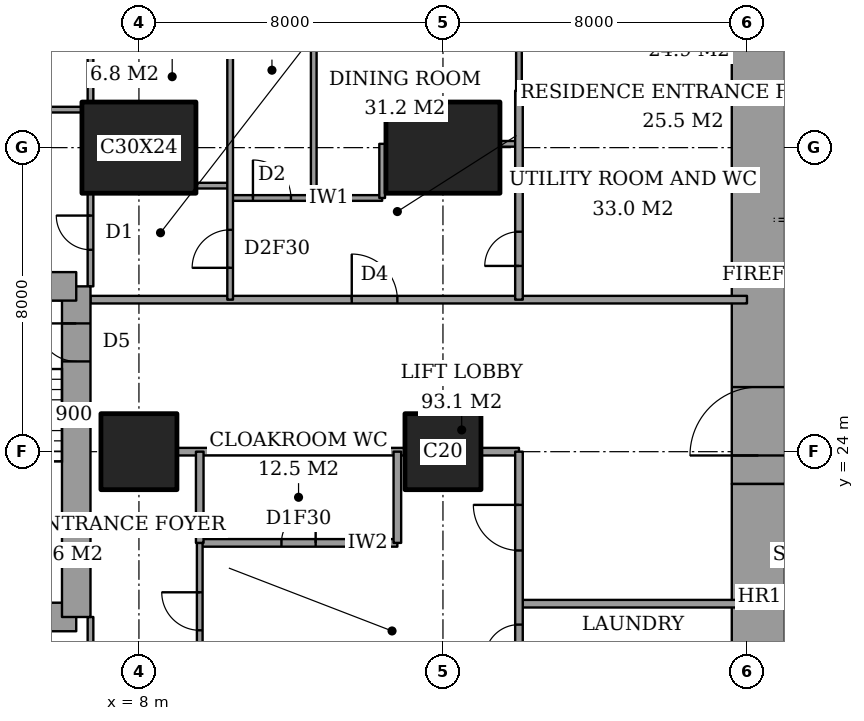
"""IFC4 building model, lengths in metres.
Left out: names, types, materials, properties, quantities, classifications, styles, units other than length and angle.
Written with IfcOpenShell. Run it as: python <this file> out.ifc"""

import sys

from ifc_helpers import new_model, si_unit, direction, frame, frame_2d, origin, origin_2d, place, context, subcontext, project, spatial, rectangle, extrude, element, fill, save


model = new_model("IFC4")
c1 = context("Model", 3, precision=1e-05, world=origin(), true_north=direction((0.0, 1.0)))
c2 = subcontext(c1, "Body", "Model", "MODEL_VIEW")
j1 = project(units=[si_unit("LENGTHUNIT", "METRE"), si_unit("PLANEANGLEUNIT", "RADIAN")], contexts=[c1])
p1 = place(None, origin())
s1 = spatial("IfcSite", under=j1, at=p1, CompositionType="ELEMENT")
p2 = place(p1, origin())
s2 = spatial("IfcBuilding", under=s1, at=p2, CompositionType="ELEMENT")
p3 = place(p2, frame((0.0, 0.0, 164.6)))
s3 = spatial("IfcBuildingStorey", under=s2, at=p3, CompositionType="ELEMENT", Elevation=164.6)
p4 = place(p3, frame((8.0, 24.0, 0.0), z_axis=(0.0, 0.0, 1.0), x_axis=(1.0, 0.0, 0.0)))
e1 = element("IfcColumn", 1, at=p4, inside=s3, PredefinedType="COLUMN", context=c2, shape_type="SweptSolid", body=[
    extrude(rectangle(XDim=2.0, YDim=2.0, at=origin_2d()), origin(), (0.0, 0.0, 1.0), 3.6),
])
p5 = place(p3, frame((8.0, 32.0, 0.0), z_axis=(0.0, 0.0, 1.0), x_axis=(1.0, 0.0, 0.0)))
e2 = element("IfcColumn", 2, at=p5, inside=s3, PredefinedType="COLUMN", context=c2, shape_type="SweptSolid", body=[
    extrude(rectangle(XDim=3.0, YDim=2.4, at=origin_2d()), origin(), (0.0, 0.0, 1.0), 3.6),
])
p6 = place(p3, frame((16.0, 24.0, 0.0), z_axis=(0.0, 0.0, 1.0), x_axis=(1.0, 0.0, 0.0)))
e3 = element("IfcColumn", 3, at=p6, inside=s3, PredefinedType="COLUMN", context=c2, shape_type="SweptSolid", body=[
    extrude(rectangle(XDim=2.0, YDim=2.0, at=origin_2d()), origin(), (0.0, 0.0, 1.0), 3.6),
])
p7 = place(p3, frame((16.0, 32.0, 0.0), z_axis=(0.0, 0.0, 1.0), x_axis=(1.0, 0.0, 0.0)))
e4 = element("IfcColumn", 4, at=p7, inside=s3, PredefinedType="COLUMN", context=c2, shape_type="SweptSolid", body=[
    extrude(rectangle(XDim=3.0, YDim=2.4, at=origin_2d()), origin(), (0.0, 0.0, 1.0), 3.6),
])
p8 = place(p3, frame((24.3, 13.0, 0.0), z_axis=(0.0, 0.0, 1.0), x_axis=(0.0, 1.0, 0.0)))
e5 = element("IfcWall", 5, at=p8, inside=s3, PredefinedType="SHEAR", context=c2, shape_type="SweptSolid", body=[
    extrude(rectangle(XDim=10.15, YDim=1.4, at=frame_2d((5.075, 0.0))), origin(), (0.0, 0.0, 1.0), 3.6),
])
p9 = place(p3, frame((24.3, 23.15, 0.0), z_axis=(0.0, 0.0, 1.0), x_axis=(0.0, 1.0, 0.0)))
e6 = element("IfcWall", 6, at=p9, inside=s3, PredefinedType="SHEAR", context=c2, shape_type="SweptSolid", body=[
    extrude(rectangle(XDim=11.85, YDim=1.4, at=frame_2d((5.925, 0.0))), origin(), (0.0, 0.0, 1.0), 3.6),
])
p10 = place(p9, frame((0.75, 0.0, 0.0)))
e7 = element("IfcOpeningElement", 7, at=p10, cuts=e6, PredefinedType="OPENING", context=c2, shape_type="SweptSolid", body=[
    extrude(rectangle(XDim=1.8, YDim=2.4, at=frame_2d((0.9, 1.2))), frame((0.0, 0.71, 0.0), z_axis=(0.0, -1.0, 0.0), x_axis=(1.0, 0.0, 0.0)), (0.0, 0.0, 1.0), 1.42),
])
p11 = place(p3, frame((1.9, 19.65, 0.0), z_axis=(0.0, 0.0, 1.0), x_axis=(1.0, 0.0, 0.0)))
e8 = element("IfcWall", 8, at=p11, inside=s3, PredefinedType="SHEAR", context=c2, shape_type="SweptSolid", body=[
    extrude(rectangle(XDim=4.45, YDim=0.75, at=frame_2d((2.225, 0.0))), origin(), (0.0, 0.0, 1.0), 3.6),
])
p12 = place(p3, frame((6.35, 19.65, 0.0), z_axis=(0.0, 0.0, 1.0), x_axis=(0.0, 1.0, 0.0)))
e9 = element("IfcWall", 9, at=p12, inside=s3, PredefinedType="SHEAR", context=c2, shape_type="SweptSolid", body=[
    extrude(rectangle(XDim=8.7, YDim=0.75, at=frame_2d((4.35, 0.0))), origin(), (0.0, 0.0, 1.0), 3.6),
])
p13 = place(p12, frame((6.725, 0.0, 0.0)))
e10 = element("IfcOpeningElement", 10, at=p13, cuts=e9, PredefinedType="OPENING", context=c2, shape_type="SweptSolid", body=[
    extrude(rectangle(XDim=1.0, YDim=2.1, at=frame_2d((0.5, 1.05))), frame((0.0, 0.385, 0.0), z_axis=(0.0, -1.0, 0.0), x_axis=(1.0, 0.0, 0.0)), (0.0, 0.0, 1.0), 0.77),
])
p14 = place(p3, frame((6.35, 28.35, 0.0), z_axis=(0.0, 0.0, 1.0), x_axis=(-1.0, 0.0, 0.0)))
e11 = element("IfcWall", 11, at=p14, inside=s3, PredefinedType="SHEAR", context=c2, shape_type="SweptSolid", body=[
    extrude(rectangle(XDim=4.45, YDim=0.75, at=frame_2d((2.225, 0.0))), origin(), (0.0, 0.0, 1.0), 3.6),
])
p15 = place(p3, frame((18.0, 20.0, 0.0), z_axis=(0.0, 0.0, 1.0), x_axis=(1.0, 0.0, 0.0)))
e12 = element("IfcWall", 12, at=p15, inside=s3, PredefinedType="PARTITIONING", context=c2, shape_type="SweptSolid", body=[
    extrude(rectangle(XDim=6.0, YDim=0.2, at=frame_2d((3.0, 0.0))), origin(), (0.0, 0.0, 1.0), 3.35),
])
p16 = place(p3, frame((9.6, 21.6, 0.0), z_axis=(0.0, 0.0, 1.0), x_axis=(1.0, 0.0, 0.0)))
e13 = element("IfcWall", 13, at=p16, inside=s3, PredefinedType="PARTITIONING", context=c2, shape_type="SweptSolid", body=[
    extrude(rectangle(XDim=5.2, YDim=0.2, at=frame_2d((2.6, 0.0))), origin(), (0.0, 0.0, 1.0), 3.35),
])
p17 = place(p16, frame((2.15, 0.0, 0.0)))
e14 = element("IfcOpeningElement", 14, at=p17, cuts=e13, PredefinedType="OPENING", context=c2, shape_type="SweptSolid", body=[
    extrude(rectangle(XDim=0.9, YDim=2.1, at=frame_2d((0.45, 1.05))), frame((0.0, 0.11, 0.0), z_axis=(0.0, -1.0, 0.0), x_axis=(1.0, 0.0, 0.0)), (0.0, 0.0, 1.0), 0.22),
])
p18 = place(p3, frame((9.0, 24.0, 0.0), z_axis=(0.0, 0.0, 1.0), x_axis=(1.0, 0.0, 0.0)))
e15 = element("IfcWall", 15, at=p18, inside=s3, PredefinedType="PARTITIONING", context=c2, shape_type="SweptSolid", body=[
    extrude(rectangle(XDim=6.0, YDim=0.2, at=frame_2d((3.0, 0.0))), origin(), (0.0, 0.0, 1.0), 3.35),
])
p19 = place(p3, frame((17.0, 24.0, 0.0), z_axis=(0.0, 0.0, 1.0), x_axis=(1.0, 0.0, 0.0)))
e16 = element("IfcWall", 16, at=p19, inside=s3, PredefinedType="PARTITIONING", context=c2, shape_type="SweptSolid", body=[
    extrude(rectangle(XDim=1.0, YDim=0.2, at=frame_2d((0.5, 0.0))), origin(), (0.0, 0.0, 1.0), 3.35),
])
p20 = place(p3, frame((6.725, 28.0, 0.0), z_axis=(0.0, 0.0, 1.0), x_axis=(1.0, 0.0, 0.0)))
e17 = element("IfcWall", 17, at=p20, inside=s3, PredefinedType="PARTITIONING", context=c2, shape_type="SweptSolid", body=[
    extrude(rectangle(XDim=17.275, YDim=0.2, at=frame_2d((8.637, 0.0))), origin(), (0.0, 0.0, 1.0), 3.35),
])
p21 = place(p20, frame((6.875, 0.0, 0.0)))
e18 = element("IfcOpeningElement", 18, at=p21, cuts=e17, PredefinedType="OPENING", context=c2, shape_type="SweptSolid", body=[
    extrude(rectangle(XDim=1.2, YDim=2.4, at=frame_2d((0.6, 1.2))), frame((0.0, 0.11, 0.0), z_axis=(0.0, -1.0, 0.0), x_axis=(1.0, 0.0, 0.0)), (0.0, 0.0, 1.0), 0.22),
])
p22 = place(p3, frame((10.4, 30.675, 0.0), z_axis=(0.0, 0.0, 1.0), x_axis=(1.0, 0.0, 0.0)))
e19 = element("IfcWall", 19, at=p22, inside=s3, PredefinedType="PARTITIONING", context=c2, shape_type="SweptSolid", body=[
    extrude(rectangle(XDim=4.0, YDim=0.15, at=frame_2d((2.0, 0.0))), origin(), (0.0, 0.0, 1.0), 3.35),
])
p23 = place(p22, frame((0.6, 0.0, 0.0)))
e20 = element("IfcOpeningElement", 20, at=p23, cuts=e19, PredefinedType="OPENING", context=c2, shape_type="SweptSolid", body=[
    extrude(rectangle(XDim=1.0, YDim=2.1, at=frame_2d((0.5, 1.05))), frame((0.0, 0.085, 0.0), z_axis=(0.0, -1.0, 0.0), x_axis=(1.0, 0.0, 0.0)), (0.0, 0.0, 1.0), 0.17),
])
p24 = place(p3, frame((9.5, 31.0, 0.0), z_axis=(0.0, 0.0, 1.0), x_axis=(1.0, 0.0, 0.0)))
e21 = element("IfcWall", 21, at=p24, inside=s3, PredefinedType="PARTITIONING", context=c2, shape_type="SweptSolid", body=[
    extrude(rectangle(XDim=0.9, YDim=0.15, at=frame_2d((0.45, 0.0))), origin(), (0.0, 0.0, 1.0), 3.35),
])
p25 = place(p3, frame((17.5, 32.1, 0.0), z_axis=(0.0, 0.0, 1.0), x_axis=(1.0, 0.0, 0.0)))
e22 = element("IfcWall", 22, at=p25, inside=s3, PredefinedType="PARTITIONING", context=c2, shape_type="SweptSolid", body=[
    extrude(rectangle(XDim=0.5, YDim=0.15, at=frame_2d((0.25, 0.0))), origin(), (0.0, 0.0, 1.0), 2.634),
])
p26 = place(p3, frame((1.35, 33.0, 0.0), z_axis=(0.0, 0.0, 1.0), x_axis=(1.0, 0.0, 0.0)))
e23 = element("IfcWall", 23, at=p26, inside=s3, PredefinedType="PARTITIONING", context=c2, shape_type="SweptSolid", body=[
    extrude(rectangle(XDim=5.15, YDim=0.15, at=frame_2d((2.575, 0.0))), origin(), (0.0, 0.0, 1.0), 3.35),
])
p27 = place(p3, frame((18.0, 33.5, 0.0), z_axis=(0.0, 0.0, 1.0), x_axis=(1.0, 0.0, 0.0)))
e24 = element("IfcWall", 24, at=p27, inside=s3, PredefinedType="PARTITIONING", context=c2, shape_type="SweptSolid", body=[
    extrude(rectangle(XDim=6.0, YDim=0.2, at=frame_2d((3.0, 0.0))), origin(), (0.0, 0.0, 1.0), 3.35),
])
p28 = place(p3, frame((6.725, 17.2, 0.0), z_axis=(0.0, 0.0, 1.0), x_axis=(0.0, 1.0, 0.0)))
e25 = element("IfcWall", 25, at=p28, inside=s3, PredefinedType="PARTITIONING", context=c2, shape_type="SweptSolid", body=[
    extrude(rectangle(XDim=2.45, YDim=0.15, at=frame_2d((1.225, 0.0))), origin(), (0.0, 0.0, 1.0), 3.35),
])
p29 = place(p28, frame((0.538, 0.0, 0.0)))
e26 = element("IfcOpeningElement", 26, at=p29, cuts=e25, PredefinedType="OPENING", context=c2, shape_type="SweptSolid", body=[
    extrude(rectangle(XDim=1.0, YDim=2.1, at=frame_2d((0.5, 1.05))), frame((0.0, 0.085, 0.0), z_axis=(0.0, -1.0, 0.0), x_axis=(1.0, 0.0, 0.0)), (0.0, 0.0, 1.0), 0.17),
])
p30 = place(p3, frame((6.725, 28.35, 0.0), z_axis=(0.0, 0.0, 1.0), x_axis=(0.0, 1.0, 0.0)))
e27 = element("IfcWall", 27, at=p30, inside=s3, PredefinedType="PARTITIONING", context=c2, shape_type="SweptSolid", body=[
    extrude(rectangle(XDim=2.45, YDim=0.15, at=frame_2d((1.225, 0.0))), origin(), (0.0, 0.0, 1.0), 3.35),
])
p31 = place(p30, frame((0.962, 0.0, 0.0)))
e28 = element("IfcOpeningElement", 28, at=p31, cuts=e27, PredefinedType="OPENING", context=c2, shape_type="SweptSolid", body=[
    extrude(rectangle(XDim=0.9, YDim=2.1, at=frame_2d((0.45, 1.05))), frame((0.0, 0.085, 0.0), z_axis=(0.0, -1.0, 0.0), x_axis=(1.0, 0.0, 0.0)), (0.0, 0.0, 1.0), 0.17),
])
p32 = place(p3, frame((6.725, 33.2, 0.0), z_axis=(0.0, 0.0, 1.0), x_axis=(0.0, 1.0, 0.0)))
e29 = element("IfcWall", 29, at=p32, inside=s3, PredefinedType="PARTITIONING", context=c2, shape_type="SweptSolid", body=[
    extrude(rectangle(XDim=4.2, YDim=0.15, at=frame_2d((2.1, 0.0))), origin(), (0.0, 0.0, 1.0), 3.35),
])
p33 = place(p3, frame((9.6, 21.6, 0.0), z_axis=(0.0, 0.0, 1.0), x_axis=(0.0, 1.0, 0.0)))
e30 = element("IfcWall", 30, at=p33, inside=s3, PredefinedType="PARTITIONING", context=c2, shape_type="SweptSolid", body=[
    extrude(rectangle(XDim=2.4, YDim=0.2, at=frame_2d((1.2, 0.0))), origin(), (0.0, 0.0, 1.0), 3.35),
])
p34 = place(p3, frame((9.6, 10.6, 0.0), z_axis=(0.0, 0.0, 1.0), x_axis=(0.0, 1.0, 0.0)))
e31 = element("IfcWall", 31, at=p34, inside=s3, PredefinedType="PARTITIONING", context=c2, shape_type="SweptSolid", body=[
    extrude(rectangle(XDim=11.0, YDim=0.15, at=frame_2d((5.5, 0.0))), origin(), (0.0, 0.0, 1.0), 3.35),
])
p35 = place(p34, frame((8.7, 0.0, 0.0)))
e32 = element("IfcOpeningElement", 32, at=p35, cuts=e31, PredefinedType="OPENING", context=c2, shape_type="SweptSolid", body=[
    extrude(rectangle(XDim=1.0, YDim=2.1, at=frame_2d((0.5, 1.05))), frame((0.0, 0.085, 0.0), z_axis=(0.0, -1.0, 0.0), x_axis=(1.0, 0.0, 0.0)), (0.0, 0.0, 1.0), 0.17),
])
p36 = place(p3, frame((10.4, 28.0, 0.0), z_axis=(0.0, 0.0, 1.0), x_axis=(0.0, 1.0, 0.0)))
e33 = element("IfcWall", 33, at=p36, inside=s3, PredefinedType="PARTITIONING", context=c2, shape_type="SweptSolid", body=[
    extrude(rectangle(XDim=9.4, YDim=0.15, at=frame_2d((4.7, 0.0))), origin(), (0.0, 0.0, 1.0), 3.35),
])
p37 = place(p36, frame((0.837, 0.0, 0.0)))
e34 = element("IfcOpeningElement", 34, at=p37, cuts=e33, PredefinedType="OPENING", context=c2, shape_type="SweptSolid", body=[
    extrude(rectangle(XDim=1.0, YDim=2.1, at=frame_2d((0.5, 1.05))), frame((0.0, 0.085, 0.0), z_axis=(0.0, -1.0, 0.0), x_axis=(1.0, 0.0, 0.0)), (0.0, 0.0, 1.0), 0.17),
])
p38 = place(p3, frame((12.6, 30.675, 0.0), z_axis=(0.0, 0.0, 1.0), x_axis=(0.0, 1.0, 0.0)))
e35 = element("IfcWall", 35, at=p38, inside=s3, PredefinedType="PARTITIONING", context=c2, shape_type="SweptSolid", body=[
    extrude(rectangle(XDim=6.725, YDim=0.15, at=frame_2d((3.362, 0.0))), origin(), (0.0, 0.0, 1.0), 3.35),
])
p39 = place(p3, frame((14.4, 30.675, 0.0), z_axis=(0.0, 0.0, 1.0), x_axis=(0.0, 1.0, 0.0)))
e36 = element("IfcWall", 36, at=p39, inside=s3, PredefinedType="PARTITIONING", context=c2, shape_type="SweptSolid", body=[
    extrude(rectangle(XDim=1.425, YDim=0.15, at=frame_2d((0.712, 0.0))), origin(), (0.0, 0.0, 1.0), 3.35),
])
p40 = place(p3, frame((14.8, 21.6, 0.0), z_axis=(0.0, 0.0, 1.0), x_axis=(0.0, 1.0, 0.0)))
e37 = element("IfcWall", 37, at=p40, inside=s3, PredefinedType="PARTITIONING", context=c2, shape_type="SweptSolid", body=[
    extrude(rectangle(XDim=2.4, YDim=0.2, at=frame_2d((1.2, 0.0))), origin(), (0.0, 0.0, 1.0), 3.35),
])
p41 = place(p3, frame((18.0, 18.0, 0.0), z_axis=(0.0, 0.0, 1.0), x_axis=(0.0, 1.0, 0.0)))
e38 = element("IfcWall", 38, at=p41, inside=s3, PredefinedType="PARTITIONING", context=c2, shape_type="SweptSolid", body=[
    extrude(rectangle(XDim=6.0, YDim=0.2, at=frame_2d((3.0, 0.0))), origin(), (0.0, 0.0, 1.0), 3.35),
])
p42 = place(p41, frame((3.4, 0.0, 0.0)))
e39 = element("IfcOpeningElement", 39, at=p42, cuts=e38, PredefinedType="OPENING", context=c2, shape_type="SweptSolid", body=[
    extrude(rectangle(XDim=1.2, YDim=2.4, at=frame_2d((0.6, 1.2))), frame((0.0, 0.11, 0.0), z_axis=(0.0, -1.0, 0.0), x_axis=(1.0, 0.0, 0.0)), (0.0, 0.0, 1.0), 0.22),
])
p43 = place(p41, frame((0.55, 0.0, 0.0)))
e40 = element("IfcOpeningElement", 40, at=p43, cuts=e38, PredefinedType="OPENING", context=c2, shape_type="SweptSolid", body=[
    extrude(rectangle(XDim=0.9, YDim=2.1, at=frame_2d((0.45, 1.05))), frame((0.0, 0.11, 0.0), z_axis=(0.0, -1.0, 0.0), x_axis=(1.0, 0.0, 0.0)), (0.0, 0.0, 1.0), 0.22),
])
p44 = place(p3, frame((18.0, 28.0, 0.0), z_axis=(0.0, 0.0, 1.0), x_axis=(0.0, 1.0, 0.0)))
e41 = element("IfcWall", 41, at=p44, inside=s3, PredefinedType="PARTITIONING", context=c2, shape_type="SweptSolid", body=[
    extrude(rectangle(XDim=5.5, YDim=0.2, at=frame_2d((2.75, 0.0))), origin(), (0.0, 0.0, 1.0), 3.35),
])
p45 = place(p44, frame((0.887, 0.0, 0.0)))
e42 = element("IfcOpeningElement", 42, at=p45, cuts=e41, PredefinedType="OPENING", context=c2, shape_type="SweptSolid", body=[
    extrude(rectangle(XDim=0.9, YDim=2.1, at=frame_2d((0.45, 1.05))), frame((0.0, 0.11, 0.0), z_axis=(0.0, -1.0, 0.0), x_axis=(1.0, 0.0, 0.0)), (0.0, 0.0, 1.0), 0.22),
])
p46 = place(p3, frame((18.0, 33.5, 0.0), z_axis=(0.0, 0.0, 1.0), x_axis=(0.0, 1.0, 0.0)))
e43 = element("IfcWall", 43, at=p46, inside=s3, PredefinedType="PARTITIONING", context=c2, shape_type="SweptSolid", body=[
    extrude(rectangle(XDim=3.9, YDim=0.15, at=frame_2d((1.95, 0.0))), origin(), (0.0, 0.0, 1.0), 3.35),
])
p47 = place(p35, origin())
e44 = element("IfcDoor", 44, at=p47, inside=s3, OperationType="SINGLE_SWING_LEFT", PredefinedType="DOOR", context=c2, shape_type="SweptSolid", body=[
    extrude(rectangle(XDim=1.0, YDim=2.1, at=frame_2d((0.5, 1.05))), frame((0.0, 0.025, 0.0), z_axis=(0.0, -1.0, 0.0), x_axis=(1.0, 0.0, 0.0)), (0.0, 0.0, 1.0), 0.05),
])
fill(e32, e44)
p48 = place(p17, origin())
e45 = element("IfcDoor", 45, at=p48, inside=s3, OperationType="SINGLE_SWING_LEFT", PredefinedType="DOOR", context=c2, shape_type="SweptSolid", body=[
    extrude(rectangle(XDim=0.9, YDim=2.1, at=frame_2d((0.45, 1.05))), frame((0.0, 0.025, 0.0), z_axis=(0.0, -1.0, 0.0), x_axis=(1.0, 0.0, 0.0)), (0.0, 0.0, 1.0), 0.05),
])
fill(e14, e45)
p49 = place(p42, origin())
e46 = element("IfcDoor", 46, at=p49, inside=s3, OperationType="SINGLE_SWING_LEFT", PredefinedType="DOOR", context=c2, shape_type="SweptSolid", body=[
    extrude(rectangle(XDim=1.2, YDim=2.4, at=frame_2d((0.6, 1.2))), frame((0.0, 0.025, 0.0), z_axis=(0.0, -1.0, 0.0), x_axis=(1.0, 0.0, 0.0)), (0.0, 0.0, 1.0), 0.05),
])
fill(e39, e46)
p50 = place(p43, origin())
e47 = element("IfcDoor", 47, at=p50, inside=s3, OperationType="SINGLE_SWING_RIGHT", PredefinedType="DOOR", context=c2, shape_type="SweptSolid", body=[
    extrude(rectangle(XDim=0.9, YDim=2.1, at=frame_2d((0.45, 1.05))), frame((0.0, 0.025, 0.0), z_axis=(0.0, -1.0, 0.0), x_axis=(1.0, 0.0, 0.0)), (0.0, 0.0, 1.0), 0.05),
])
fill(e40, e47)
p51 = place(p31, origin())
e48 = element("IfcDoor", 48, at=p51, inside=s3, OperationType="SINGLE_SWING_LEFT", PredefinedType="DOOR", context=c2, shape_type="SweptSolid", body=[
    extrude(rectangle(XDim=0.9, YDim=2.1, at=frame_2d((0.45, 1.05))), frame((0.0, 0.025, 0.0), z_axis=(0.0, -1.0, 0.0), x_axis=(1.0, 0.0, 0.0)), (0.0, 0.0, 1.0), 0.05),
])
fill(e28, e48)
p52 = place(p37, origin())
e49 = element("IfcDoor", 49, at=p52, inside=s3, OperationType="SINGLE_SWING_RIGHT", PredefinedType="DOOR", context=c2, shape_type="SweptSolid", body=[
    extrude(rectangle(XDim=1.0, YDim=2.1, at=frame_2d((0.5, 1.05))), frame((0.0, 0.025, 0.0), z_axis=(0.0, -1.0, 0.0), x_axis=(1.0, 0.0, 0.0)), (0.0, 0.0, 1.0), 0.05),
])
fill(e34, e49)
p53 = place(p21, origin())
e50 = element("IfcDoor", 50, at=p53, inside=s3, OperationType="SINGLE_SWING_RIGHT", PredefinedType="DOOR", context=c2, shape_type="SweptSolid", body=[
    extrude(rectangle(XDim=1.2, YDim=2.4, at=frame_2d((0.6, 1.2))), frame((0.0, 0.025, 0.0), z_axis=(0.0, -1.0, 0.0), x_axis=(1.0, 0.0, 0.0)), (0.0, 0.0, 1.0), 0.05),
])
fill(e18, e50)
p54 = place(p23, origin())
e51 = element("IfcDoor", 51, at=p54, inside=s3, OperationType="SINGLE_SWING_RIGHT", PredefinedType="DOOR", context=c2, shape_type="SweptSolid", body=[
    extrude(rectangle(XDim=1.0, YDim=2.1, at=frame_2d((0.5, 1.05))), frame((0.0, 0.025, 0.0), z_axis=(0.0, -1.0, 0.0), x_axis=(1.0, 0.0, 0.0)), (0.0, 0.0, 1.0), 0.05),
])
fill(e20, e51)
p55 = place(p45, origin())
e52 = element("IfcDoor", 52, at=p55, inside=s3, OperationType="SINGLE_SWING_RIGHT", PredefinedType="DOOR", context=c2, shape_type="SweptSolid", body=[
    extrude(rectangle(XDim=0.9, YDim=2.1, at=frame_2d((0.45, 1.05))), frame((0.0, 0.025, 0.0), z_axis=(0.0, -1.0, 0.0), x_axis=(1.0, 0.0, 0.0)), (0.0, 0.0, 1.0), 0.05),
])
fill(e42, e52)
p56 = place(p10, origin())
e53 = element("IfcDoor", 53, at=p56, inside=s3, OperationType="DOUBLE_DOOR_DOUBLE_SWING", PredefinedType="DOOR", context=c2, shape_type="SweptSolid", body=[
    extrude(rectangle(XDim=1.8, YDim=2.4, at=frame_2d((0.9, 1.2))), frame((0.0, 0.025, 0.0), z_axis=(0.0, -1.0, 0.0), x_axis=(1.0, 0.0, 0.0)), (0.0, 0.0, 1.0), 0.05),
])
fill(e7, e53)
p57 = place(p13, origin())
e54 = element("IfcDoor", 54, at=p57, inside=s3, OperationType="SINGLE_SWING_LEFT", PredefinedType="DOOR", context=c2, shape_type="SweptSolid", body=[
    extrude(rectangle(XDim=1.0, YDim=2.1, at=frame_2d((0.5, 1.05))), frame((0.0, 0.025, 0.0), z_axis=(0.0, -1.0, 0.0), x_axis=(1.0, 0.0, 0.0)), (0.0, 0.0, 1.0), 0.05),
])
fill(e10, e54)
save(model, sys.argv[1])
